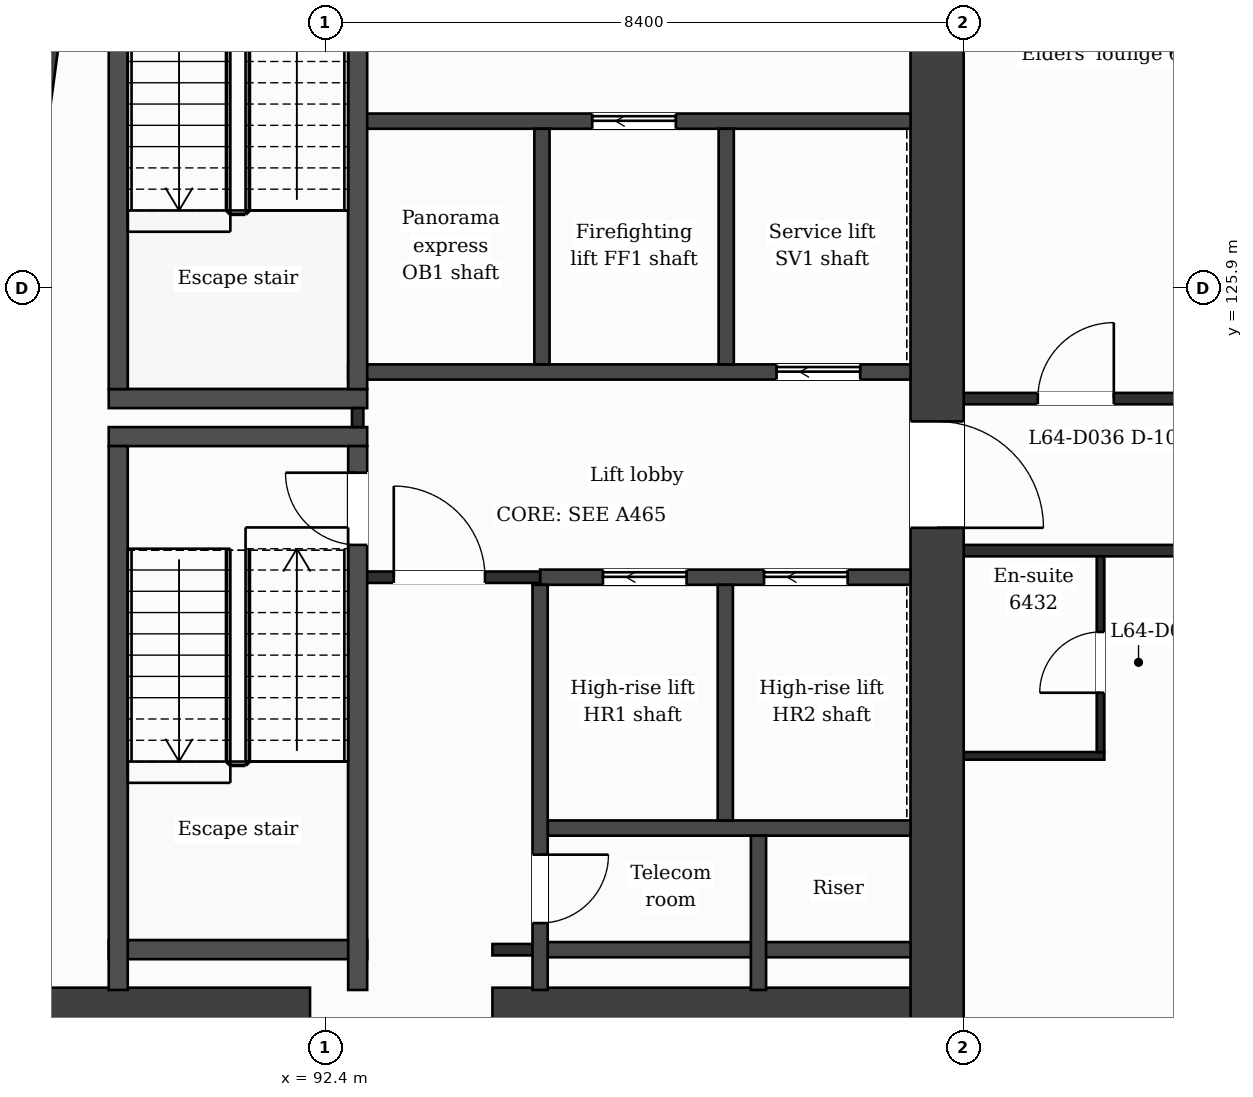
"""IFC4 building model, lengths in metres.
Left out: names, types, materials, properties, quantities, classifications, styles, units other than length and angle.
Written with IfcOpenShell. Run it as: python <this file> out.ifc"""

import sys

from ifc_helpers import new_model, si_unit, direction, frame, frame_2d, origin, place, context, subcontext, project, spatial, rectangle, extrude, element, fill, save


model = new_model("IFC4")
c1 = context("Model", 3, precision=1e-05, world=origin(), true_north=direction((0.0, 1.0)))
c2 = subcontext(c1, "Body", "Model", "MODEL_VIEW")
j1 = project(units=[si_unit("LENGTHUNIT", "METRE"), si_unit("PLANEANGLEUNIT", "RADIAN")], contexts=[c1])
p1 = place(None, origin())
s1 = spatial("IfcSite", under=j1, at=p1, CompositionType="ELEMENT")
p2 = place(p1, origin())
s2 = spatial("IfcBuilding", under=s1, at=p2, CompositionType="ELEMENT")
p3 = place(p2, frame((0.0, 0.0, 266.4)))
s3 = spatial("IfcBuildingStorey", under=s2, at=p3, CompositionType="ELEMENT", Elevation=266.4)
p4 = place(p3, frame((100.45, 132.05, 0.0), z_axis=(0.0, 0.0, 1.0), x_axis=(0.0, -1.0, 0.0)))
e1 = element("IfcWall", 1, at=p4, inside=s3, PredefinedType="SHEAR", context=c2, shape_type="SweptSolid", body=[
    extrude(rectangle(XDim=21.3, YDim=0.7, at=frame_2d((10.65, 0.0))), origin(), (0.0, 0.0, 1.0), 3.7),
])
p5 = place(p4, frame((7.9, 0.0, 0.0)))
e2 = element("IfcOpeningElement", 2, at=p5, cuts=e1, PredefinedType="OPENING", context=c2, shape_type="SweptSolid", body=[
    extrude(rectangle(XDim=1.4, YDim=2.1, at=frame_2d((0.7, 1.05))), frame((0.0, 0.36, 0.0), z_axis=(0.0, -1.0, 0.0), x_axis=(1.0, 0.0, 0.0)), (0.0, 0.0, 1.0), 0.72),
])
p6 = place(p3, frame((86.07, 110.75, 0.0), z_axis=(0.0, 0.0, 1.0), x_axis=(0.133406218907, 0.991061441464, 0.0)))
e3 = element("IfcWall", 3, at=p6, inside=s3, PredefinedType="SHEAR", context=c2, shape_type="SweptSolid", body=[
    extrude(rectangle(XDim=21.492, YDim=0.7, at=frame_2d((10.746, 0.0))), origin(), (0.0, 0.0, 1.0), 3.7),
])
p7 = place(p3, frame((87.123, 116.35, 0.0), z_axis=(0.0, 0.0, 1.0), x_axis=(1.0, 0.0, 0.0)))
e4 = element("IfcWall", 4, at=p7, inside=s3, PredefinedType="SHEAR", context=c2, shape_type="SweptSolid", body=[
    extrude(rectangle(XDim=5.077, YDim=0.7, at=frame_2d((2.539, 0.0))), origin(), (0.0, 0.0, 1.0), 3.7),
])
p8 = place(p3, frame((94.6, 116.35, 0.0), z_axis=(0.0, 0.0, 1.0), x_axis=(1.0, 0.0, 0.0)))
e5 = element("IfcWall", 5, at=p8, inside=s3, PredefinedType="SHEAR", context=c2, shape_type="SweptSolid", body=[
    extrude(rectangle(XDim=5.5, YDim=0.7, at=frame_2d((2.75, 0.0))), origin(), (0.0, 0.0, 1.0), 3.7),
])
p9 = place(p3, frame((95.227, 117.2, 0.0), z_axis=(0.0, 0.0, 1.0), x_axis=(1.0, 0.0, 0.0)))
e6 = element("IfcWall", 6, at=p9, inside=s3, PredefinedType="PARTITIONING", context=c2, shape_type="SweptSolid", body=[
    extrude(rectangle(XDim=4.873, YDim=0.2, at=frame_2d((2.437, 0.0))), origin(), (0.0, 0.0, 1.0), 3.38),
])
p10 = place(p3, frame((94.6, 117.2, 0.0), z_axis=(0.0, 0.0, 1.0), x_axis=(1.0, 0.0, 0.0)))
e7 = element("IfcWall", 7, at=p10, inside=s3, PredefinedType="PARTITIONING", context=c2, shape_type="SweptSolid", body=[
    extrude(rectangle(XDim=0.627, YDim=0.15, at=frame_2d((0.313, 0.0))), origin(), (0.0, 0.0, 1.0), 3.38),
])
p11 = place(p3, frame((89.552, 117.2, 0.0), z_axis=(0.0, 0.0, 1.0), x_axis=(1.0, 0.0, 0.0)))
e8 = element("IfcWall", 8, at=p11, inside=s3, PredefinedType="PARTITIONING", context=c2, shape_type="SweptSolid", body=[
    extrude(rectangle(XDim=3.4, YDim=0.25, at=frame_2d((1.7, 0.0))), origin(), (0.0, 0.0, 1.0), 3.38),
])
p12 = place(p3, frame((95.227, 118.8, 0.0), z_axis=(0.0, 0.0, 1.0), x_axis=(1.0, 0.0, 0.0)))
e9 = element("IfcWall", 9, at=p12, inside=s3, PredefinedType="PARTITIONING", context=c2, shape_type="SweptSolid", body=[
    extrude(rectangle(XDim=4.873, YDim=0.2, at=frame_2d((2.437, 0.0))), origin(), (0.0, 0.0, 1.0), 3.38),
])
p13 = place(p3, frame((100.8, 119.75, 0.0), z_axis=(0.0, 0.0, 1.0), x_axis=(1.0, 0.0, 0.0)))
e10 = element("IfcWall", 10, at=p13, inside=s3, PredefinedType="PARTITIONING", context=c2, shape_type="SweptSolid", body=[
    extrude(rectangle(XDim=1.85, YDim=0.1, at=frame_2d((0.925, 0.0))), origin(), (0.0, 0.0, 1.0), 3.38),
])
p14 = place(p3, frame((95.227, 122.1, 0.0), z_axis=(0.0, 0.0, 1.0), x_axis=(1.0, 0.0, 0.0)))
e11 = element("IfcWall", 11, at=p14, inside=s3, PredefinedType="PARTITIONING", context=c2, shape_type="SweptSolid", body=[
    extrude(rectangle(XDim=4.873, YDim=0.2, at=frame_2d((2.437, 0.0))), origin(), (0.0, 0.0, 1.0), 3.38),
])
p15 = place(p14, frame((0.827, 0.0, 0.0)))
e12 = element("IfcOpeningElement", 12, at=p15, cuts=e11, PredefinedType="OPENING", context=c2, shape_type="SweptSolid", body=[
    extrude(rectangle(XDim=1.1, YDim=2.1, at=frame_2d((0.55, 1.05))), frame((0.0, 0.11, 0.0), z_axis=(0.0, -1.0, 0.0), x_axis=(1.0, 0.0, 0.0)), (0.0, 0.0, 1.0), 0.22),
])
p16 = place(p14, frame((2.946, 0.0, 0.0)))
e13 = element("IfcOpeningElement", 13, at=p16, cuts=e11, PredefinedType="OPENING", context=c2, shape_type="SweptSolid", body=[
    extrude(rectangle(XDim=1.1, YDim=2.1, at=frame_2d((0.55, 1.05))), frame((0.0, 0.11, 0.0), z_axis=(0.0, -1.0, 0.0), x_axis=(1.0, 0.0, 0.0)), (0.0, 0.0, 1.0), 0.22),
])
p17 = place(p3, frame((92.827, 122.1, 0.0), z_axis=(0.0, 0.0, 1.0), x_axis=(1.0, 0.0, 0.0)))
e14 = element("IfcWall", 14, at=p17, inside=s3, PredefinedType="PARTITIONING", context=c2, shape_type="SweptSolid", body=[
    extrude(rectangle(XDim=2.4, YDim=0.15, at=frame_2d((1.2, 0.0))), origin(), (0.0, 0.0, 1.0), 3.38),
])
p18 = place(p17, frame((0.475, 0.0, 0.0)))
e15 = element("IfcOpeningElement", 15, at=p18, cuts=e14, PredefinedType="OPENING", context=c2, shape_type="SweptSolid", body=[
    extrude(rectangle(XDim=1.2, YDim=2.1, at=frame_2d((0.6, 1.05))), frame((0.0, 0.085, 0.0), z_axis=(0.0, -1.0, 0.0), x_axis=(1.0, 0.0, 0.0)), (0.0, 0.0, 1.0), 0.17),
])
p19 = place(p3, frame((100.8, 122.45, 0.0), z_axis=(0.0, 0.0, 1.0), x_axis=(1.0, 0.0, 0.0)))
e16 = element("IfcWall", 16, at=p19, inside=s3, PredefinedType="PARTITIONING", context=c2, shape_type="SweptSolid", body=[
    extrude(rectangle(XDim=25.2, YDim=0.15, at=frame_2d((12.6, 0.0))), origin(), (0.0, 0.0, 1.0), 3.38),
])
p20 = place(p19, frame((5.55, 0.0, 0.0)))
e17 = element("IfcOpeningElement", 17, at=p20, cuts=e16, PredefinedType="OPENING", context=c2, shape_type="SweptSolid", body=[
    extrude(rectangle(XDim=1.0, YDim=2.1, at=frame_2d((0.5, 1.05))), frame((0.0, 0.085, 0.0), z_axis=(0.0, -1.0, 0.0), x_axis=(1.0, 0.0, 0.0)), (0.0, 0.0, 1.0), 0.17),
])
p21 = place(p19, frame((8.65, 0.0, 0.0)))
e18 = element("IfcOpeningElement", 18, at=p21, cuts=e16, PredefinedType="OPENING", context=c2, shape_type="SweptSolid", body=[
    extrude(rectangle(XDim=1.0, YDim=2.1, at=frame_2d((0.5, 1.05))), frame((0.0, 0.085, 0.0), z_axis=(0.0, -1.0, 0.0), x_axis=(1.0, 0.0, 0.0)), (0.0, 0.0, 1.0), 0.17),
])
p22 = place(p19, frame((19.83, 0.0, 0.0)))
e19 = element("IfcOpeningElement", 19, at=p22, cuts=e16, PredefinedType="OPENING", context=c2, shape_type="SweptSolid", body=[
    extrude(rectangle(XDim=1.0, YDim=2.1, at=frame_2d((0.5, 1.05))), frame((0.0, 0.085, 0.0), z_axis=(0.0, -1.0, 0.0), x_axis=(1.0, 0.0, 0.0)), (0.0, 0.0, 1.0), 0.17),
])
for number, where, z_axis, x_axis in (
    (20, (89.552, 123.95, 0.0), (0.0, 0.0, 1.0), (1.0, 0.0, 0.0)),
    (21, (89.552, 124.45, 0.0), (0.0, 0.0, 1.0), (1.0, 0.0, 0.0)),
):
    element("IfcWall", number, at=place(p3, frame(where, z_axis=z_axis, x_axis=x_axis)), inside=s3, PredefinedType="PARTITIONING", context=c2, shape_type="SweptSolid", body=[
        extrude(rectangle(XDim=3.4, YDim=0.25, at=frame_2d((1.7, 0.0))), origin(), (0.0, 0.0, 1.0), 3.38),
    ])
p23 = place(p3, frame((100.8, 124.45, 0.0), z_axis=(0.0, 0.0, 1.0), x_axis=(1.0, 0.0, 0.0)))
e22 = element("IfcWall", 22, at=p23, inside=s3, PredefinedType="PARTITIONING", context=c2, shape_type="SweptSolid", body=[
    extrude(rectangle(XDim=25.2, YDim=0.15, at=frame_2d((12.6, 0.0))), origin(), (0.0, 0.0, 1.0), 3.38),
])
p24 = place(p23, frame((0.975, 0.0, 0.0)))
e23 = element("IfcOpeningElement", 23, at=p24, cuts=e22, PredefinedType="OPENING", context=c2, shape_type="SweptSolid", body=[
    extrude(rectangle(XDim=1.0, YDim=2.1, at=frame_2d((0.5, 1.05))), frame((0.0, 0.085, 0.0), z_axis=(0.0, -1.0, 0.0), x_axis=(1.0, 0.0, 0.0)), (0.0, 0.0, 1.0), 0.17),
])
p25 = place(p23, frame((5.175, 0.0, 0.0)))
e24 = element("IfcOpeningElement", 24, at=p25, cuts=e22, PredefinedType="OPENING", context=c2, shape_type="SweptSolid", body=[
    extrude(rectangle(XDim=1.0, YDim=2.1, at=frame_2d((0.5, 1.05))), frame((0.0, 0.085, 0.0), z_axis=(0.0, -1.0, 0.0), x_axis=(1.0, 0.0, 0.0)), (0.0, 0.0, 1.0), 0.17),
])
p26 = place(p23, frame((13.775, 0.0, 0.0)))
e25 = element("IfcOpeningElement", 25, at=p26, cuts=e22, PredefinedType="OPENING", context=c2, shape_type="SweptSolid", body=[
    extrude(rectangle(XDim=1.0, YDim=2.1, at=frame_2d((0.5, 1.05))), frame((0.0, 0.085, 0.0), z_axis=(0.0, -1.0, 0.0), x_axis=(1.0, 0.0, 0.0)), (0.0, 0.0, 1.0), 0.17),
])
p27 = place(p23, frame((17.67, 0.0, 0.0)))
e26 = element("IfcOpeningElement", 26, at=p27, cuts=e22, PredefinedType="OPENING", context=c2, shape_type="SweptSolid", body=[
    extrude(rectangle(XDim=1.0, YDim=2.1, at=frame_2d((0.5, 1.05))), frame((0.0, 0.085, 0.0), z_axis=(0.0, -1.0, 0.0), x_axis=(1.0, 0.0, 0.0)), (0.0, 0.0, 1.0), 0.17),
])
p28 = place(p23, frame((23.225, 0.0, 0.0)))
e27 = element("IfcOpeningElement", 27, at=p28, cuts=e22, PredefinedType="OPENING", context=c2, shape_type="SweptSolid", body=[
    extrude(rectangle(XDim=1.0, YDim=2.1, at=frame_2d((0.5, 1.05))), frame((0.0, 0.085, 0.0), z_axis=(0.0, -1.0, 0.0), x_axis=(1.0, 0.0, 0.0)), (0.0, 0.0, 1.0), 0.17),
])
p29 = place(p3, frame((92.702, 124.8, 0.0), z_axis=(0.0, 0.0, 1.0), x_axis=(1.0, 0.0, 0.0)))
e28 = element("IfcWall", 28, at=p29, inside=s3, PredefinedType="PARTITIONING", context=c2, shape_type="SweptSolid", body=[
    extrude(rectangle(XDim=7.398, YDim=0.2, at=frame_2d((3.699, 0.0))), origin(), (0.0, 0.0, 1.0), 3.38),
])
p30 = place(p29, frame((5.636, 0.0, 0.0)))
e29 = element("IfcOpeningElement", 29, at=p30, cuts=e28, PredefinedType="OPENING", context=c2, shape_type="SweptSolid", body=[
    extrude(rectangle(XDim=1.1, YDim=2.1, at=frame_2d((0.55, 1.05))), frame((0.0, 0.11, 0.0), z_axis=(0.0, -1.0, 0.0), x_axis=(1.0, 0.0, 0.0)), (0.0, 0.0, 1.0), 0.22),
])
p31 = place(p3, frame((92.827, 128.1, 0.0), z_axis=(0.0, 0.0, 1.0), x_axis=(1.0, 0.0, 0.0)))
e30 = element("IfcWall", 30, at=p31, inside=s3, PredefinedType="PARTITIONING", context=c2, shape_type="SweptSolid", body=[
    extrude(rectangle(XDim=7.273, YDim=0.2, at=frame_2d((3.637, 0.0))), origin(), (0.0, 0.0, 1.0), 3.38),
])
p32 = place(p31, frame((3.086, 0.0, 0.0)))
e31 = element("IfcOpeningElement", 31, at=p32, cuts=e30, PredefinedType="OPENING", context=c2, shape_type="SweptSolid", body=[
    extrude(rectangle(XDim=1.1, YDim=2.1, at=frame_2d((0.55, 1.05))), frame((0.0, 0.11, 0.0), z_axis=(0.0, -1.0, 0.0), x_axis=(1.0, 0.0, 0.0)), (0.0, 0.0, 1.0), 0.22),
])
for number, where, z_axis, x_axis in (
    (32, (89.677, 116.67, 0.0), (0.0, 0.0, 1.0), (0.0, 1.0, 0.0)),
    (33, (89.677, 124.575, 0.0), (0.0, 0.0, 1.0), (0.0, 1.0, 0.0)),
):
    element("IfcWall", number, at=place(p3, frame(where, z_axis=z_axis, x_axis=x_axis)), inside=s3, PredefinedType="PARTITIONING", context=c2, shape_type="SweptSolid", body=[
        extrude(rectangle(XDim=7.155, YDim=0.25, at=frame_2d((3.578, 0.0))), origin(), (0.0, 0.0, 1.0), 3.38),
    ])
p33 = place(p3, frame((92.827, 124.075, 0.0), z_axis=(0.0, 0.0, 1.0), x_axis=(0.0, 1.0, 0.0)))
e34 = element("IfcWall", 34, at=p33, inside=s3, PredefinedType="PARTITIONING", context=c2, shape_type="SweptSolid", body=[
    extrude(rectangle(XDim=0.25, YDim=0.15, at=frame_2d((0.125, 0.0))), origin(), (0.0, 0.0, 1.0), 3.38),
])
p34 = place(p3, frame((92.827, 116.67, 0.0), z_axis=(0.0, 0.0, 1.0), x_axis=(0.0, 1.0, 0.0)))
e35 = element("IfcWall", 35, at=p34, inside=s3, PredefinedType="PARTITIONING", context=c2, shape_type="SweptSolid", body=[
    extrude(rectangle(XDim=7.155, YDim=0.25, at=frame_2d((3.578, 0.0))), origin(), (0.0, 0.0, 1.0), 3.38),
])
p35 = place(p34, frame((5.855, 0.0, 0.0)))
e36 = element("IfcOpeningElement", 36, at=p35, cuts=e35, PredefinedType="OPENING", context=c2, shape_type="SweptSolid", body=[
    extrude(rectangle(XDim=0.95, YDim=2.1, at=frame_2d((0.475, 1.05))), frame((0.0, 0.135, 0.0), z_axis=(0.0, -1.0, 0.0), x_axis=(1.0, 0.0, 0.0)), (0.0, 0.0, 1.0), 0.27),
])
p36 = place(p3, frame((92.827, 124.575, 0.0), z_axis=(0.0, 0.0, 1.0), x_axis=(0.0, 1.0, 0.0)))
e37 = element("IfcWall", 37, at=p36, inside=s3, PredefinedType="PARTITIONING", context=c2, shape_type="SweptSolid", body=[
    extrude(rectangle(XDim=7.155, YDim=0.25, at=frame_2d((3.578, 0.0))), origin(), (0.0, 0.0, 1.0), 3.38),
])
p37 = place(p36, frame((5.325, 0.0, 0.0)))
e38 = element("IfcOpeningElement", 38, at=p37, cuts=e37, PredefinedType="OPENING", context=c2, shape_type="SweptSolid", body=[
    extrude(rectangle(XDim=1.0, YDim=2.1, at=frame_2d((0.5, 1.05))), frame((0.0, 0.135, 0.0), z_axis=(0.0, -1.0, 0.0), x_axis=(1.0, 0.0, 0.0)), (0.0, 0.0, 1.0), 0.27),
])
p38 = place(p3, frame((95.227, 116.67, 0.0), z_axis=(0.0, 0.0, 1.0), x_axis=(0.0, 1.0, 0.0)))
e39 = element("IfcWall", 39, at=p38, inside=s3, PredefinedType="PARTITIONING", context=c2, shape_type="SweptSolid", body=[
    extrude(rectangle(XDim=5.33, YDim=0.2, at=frame_2d((2.665, 0.0))), origin(), (0.0, 0.0, 1.0), 3.38),
])
p39 = place(p38, frame((0.88, 0.0, 0.0)))
e40 = element("IfcOpeningElement", 40, at=p39, cuts=e39, PredefinedType="OPENING", context=c2, shape_type="SweptSolid", body=[
    extrude(rectangle(XDim=0.9, YDim=2.1, at=frame_2d((0.45, 1.05))), frame((0.0, 0.11, 0.0), z_axis=(0.0, -1.0, 0.0), x_axis=(1.0, 0.0, 0.0)), (0.0, 0.0, 1.0), 0.22),
])
for number, where, z_axis, x_axis in (
    (41, (95.251, 124.9, 0.0), (0.0, 0.0, 1.0), (0.0, 1.0, 0.0)),
    (42, (97.664, 118.9, 0.0), (0.0, 0.0, 1.0), (0.0, 1.0, 0.0)),
    (43, (97.676, 124.9, 0.0), (0.0, 0.0, 1.0), (0.0, 1.0, 0.0)),
):
    element("IfcWall", number, at=place(p3, frame(where, z_axis=z_axis, x_axis=x_axis)), inside=s3, PredefinedType="PARTITIONING", context=c2, shape_type="SweptSolid", body=[
        extrude(rectangle(XDim=3.1, YDim=0.2, at=frame_2d((1.55, 0.0))), origin(), (0.0, 0.0, 1.0), 3.38),
    ])
p40 = place(p3, frame((98.1, 116.67, 0.0), z_axis=(0.0, 0.0, 1.0), x_axis=(0.0, 1.0, 0.0)))
e44 = element("IfcWall", 44, at=p40, inside=s3, PredefinedType="PARTITIONING", context=c2, shape_type="SweptSolid", body=[
    extrude(rectangle(XDim=2.03, YDim=0.2, at=frame_2d((1.015, 0.0))), origin(), (0.0, 0.0, 1.0), 3.38),
])
p41 = place(p3, frame((102.6, 119.8, 0.0), z_axis=(0.0, 0.0, 1.0), x_axis=(0.0, 1.0, 0.0)))
e45 = element("IfcWall", 45, at=p41, inside=s3, PredefinedType="PARTITIONING", context=c2, shape_type="SweptSolid", body=[
    extrude(rectangle(XDim=2.575, YDim=0.1, at=frame_2d((1.288, 0.0))), origin(), (0.0, 0.0, 1.0), 3.38),
])
p42 = place(p41, frame((0.78, 0.0, 0.0)))
e46 = element("IfcOpeningElement", 46, at=p42, cuts=e45, PredefinedType="OPENING", context=c2, shape_type="SweptSolid", body=[
    extrude(rectangle(XDim=0.8, YDim=2.1, at=frame_2d((0.4, 1.05))), frame((0.0, 0.06, 0.0), z_axis=(0.0, -1.0, 0.0), x_axis=(1.0, 0.0, 0.0)), (0.0, 0.0, 1.0), 0.12),
])
p43 = place(p18, origin())
e47 = element("IfcDoor", 47, at=p43, inside=s3, OperationType="SINGLE_SWING_LEFT", PredefinedType="DOOR", context=c2, shape_type="SweptSolid", body=[
    extrude(rectangle(XDim=1.2, YDim=2.1, at=frame_2d((0.6, 1.05))), frame((0.0, 0.025, 0.0), z_axis=(0.0, -1.0, 0.0), x_axis=(1.0, 0.0, 0.0)), (0.0, 0.0, 1.0), 0.05),
])
fill(e15, e47)
p44 = place(p15, origin())
e48 = element("IfcDoor", 48, at=p44, inside=s3, OperationType="SLIDING_TO_LEFT", PredefinedType="DOOR", context=c2, shape_type="SweptSolid", body=[
    extrude(rectangle(XDim=1.1, YDim=2.1, at=frame_2d((0.55, 1.05))), frame((0.0, 0.025, 0.0), z_axis=(0.0, -1.0, 0.0), x_axis=(1.0, 0.0, 0.0)), (0.0, 0.0, 1.0), 0.05),
])
fill(e12, e48)
p45 = place(p16, origin())
e49 = element("IfcDoor", 49, at=p45, inside=s3, OperationType="SLIDING_TO_LEFT", PredefinedType="DOOR", context=c2, shape_type="SweptSolid", body=[
    extrude(rectangle(XDim=1.1, YDim=2.1, at=frame_2d((0.55, 1.05))), frame((0.0, 0.025, 0.0), z_axis=(0.0, -1.0, 0.0), x_axis=(1.0, 0.0, 0.0)), (0.0, 0.0, 1.0), 0.05),
])
fill(e13, e49)
p46 = place(p32, origin())
e50 = element("IfcDoor", 50, at=p46, inside=s3, OperationType="SLIDING_TO_LEFT", PredefinedType="DOOR", context=c2, shape_type="SweptSolid", body=[
    extrude(rectangle(XDim=1.1, YDim=2.1, at=frame_2d((0.55, 1.05))), frame((0.0, 0.025, 0.0), z_axis=(0.0, -1.0, 0.0), x_axis=(1.0, 0.0, 0.0)), (0.0, 0.0, 1.0), 0.05),
])
fill(e31, e50)
p47 = place(p30, origin())
e51 = element("IfcDoor", 51, at=p47, inside=s3, OperationType="SLIDING_TO_LEFT", PredefinedType="DOOR", context=c2, shape_type="SweptSolid", body=[
    extrude(rectangle(XDim=1.1, YDim=2.1, at=frame_2d((0.55, 1.05))), frame((0.0, 0.025, 0.0), z_axis=(0.0, -1.0, 0.0), x_axis=(1.0, 0.0, 0.0)), (0.0, 0.0, 1.0), 0.05),
])
fill(e29, e51)
p48 = place(p35, origin())
e52 = element("IfcDoor", 52, at=p48, inside=s3, OperationType="SINGLE_SWING_RIGHT", PredefinedType="DOOR", context=c2, shape_type="SweptSolid", body=[
    extrude(rectangle(XDim=0.95, YDim=2.1, at=frame_2d((0.475, 1.05))), frame((0.0, 0.025, 0.0), z_axis=(0.0, -1.0, 0.0), x_axis=(1.0, 0.0, 0.0)), (0.0, 0.0, 1.0), 0.05),
])
fill(e36, e52)
p49 = place(p39, origin())
e53 = element("IfcDoor", 53, at=p49, inside=s3, OperationType="SINGLE_SWING_RIGHT", PredefinedType="DOOR", context=c2, shape_type="SweptSolid", body=[
    extrude(rectangle(XDim=0.9, YDim=2.1, at=frame_2d((0.45, 1.05))), frame((0.0, 0.025, 0.0), z_axis=(0.0, -1.0, 0.0), x_axis=(1.0, 0.0, 0.0)), (0.0, 0.0, 1.0), 0.05),
])
fill(e40, e53)
p50 = place(p42, origin())
e54 = element("IfcDoor", 54, at=p50, inside=s3, OperationType="SINGLE_SWING_LEFT", PredefinedType="DOOR", context=c2, shape_type="SweptSolid", body=[
    extrude(rectangle(XDim=0.8, YDim=2.1, at=frame_2d((0.4, 1.05))), frame((0.0, 0.025, 0.0), z_axis=(0.0, -1.0, 0.0), x_axis=(1.0, 0.0, 0.0)), (0.0, 0.0, 1.0), 0.05),
])
fill(e46, e54)
p51 = place(p24, origin())
e55 = element("IfcDoor", 55, at=p51, inside=s3, OperationType="SINGLE_SWING_RIGHT", PredefinedType="DOOR", context=c2, shape_type="SweptSolid", body=[
    extrude(rectangle(XDim=1.0, YDim=2.1, at=frame_2d((0.5, 1.05))), frame((0.0, 0.025, 0.0), z_axis=(0.0, -1.0, 0.0), x_axis=(1.0, 0.0, 0.0)), (0.0, 0.0, 1.0), 0.05),
])
fill(e23, e55)
p52 = place(p5, origin())
e56 = element("IfcDoor", 56, at=p52, inside=s3, OperationType="SINGLE_SWING_RIGHT", PredefinedType="DOOR", context=c2, shape_type="SweptSolid", body=[
    extrude(rectangle(XDim=1.4, YDim=2.1, at=frame_2d((0.7, 1.05))), frame((0.0, 0.025, 0.0), z_axis=(0.0, -1.0, 0.0), x_axis=(1.0, 0.0, 0.0)), (0.0, 0.0, 1.0), 0.05),
])
fill(e2, e56)
save(model, sys.argv[1])
